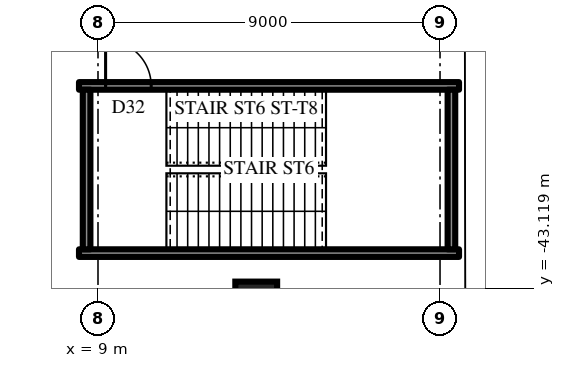
"""IFC4 building model, lengths in metres.
Left out: names, types, materials, properties, quantities, classifications, styles, units other than length and angle.
Written with IfcOpenShell. Run it as: python <this file> out.ifc"""

import sys

from ifc_helpers import new_model, si_unit, direction, frame, frame_2d, origin, origin_2d, place, context, subcontext, project, spatial, rectangle, extrude, element, fill, save


model = new_model("IFC4")
c1 = context("Model", 3, precision=1e-05, world=origin(), true_north=direction((0.0, 1.0)))
c2 = subcontext(c1, "Body", "Model", "MODEL_VIEW")
j1 = project(units=[si_unit("LENGTHUNIT", "METRE"), si_unit("PLANEANGLEUNIT", "RADIAN")], contexts=[c1])
p1 = place(None, origin())
s1 = spatial("IfcSite", under=j1, at=p1, CompositionType="ELEMENT")
p2 = place(p1, origin())
s2 = spatial("IfcBuilding", under=s1, at=p2, CompositionType="ELEMENT")
p3 = place(p2, frame((0.0, 0.0, 13.0)))
s3 = spatial("IfcBuildingStorey", under=s2, at=p3, CompositionType="ELEMENT", Elevation=13.0)
p4 = place(p3, frame((8.5, -42.2, 0.0), z_axis=(0.0, 0.0, 1.0), x_axis=(1.0, 0.0, 0.0)))
e1 = element("IfcWall", 1, at=p4, inside=s3, PredefinedType="SHEAR", context=c2, shape_type="SweptSolid", body=[
    extrude(rectangle(XDim=10.0, YDim=0.2, at=frame_2d((5.0, 0.0))), origin(), (0.0, 0.0, 1.0), 5.5),
])
p5 = place(p3, frame((18.5, -37.8, 0.0), z_axis=(0.0, 0.0, 1.0), x_axis=(-1.0, 0.0, 0.0)))
e2 = element("IfcWall", 2, at=p5, inside=s3, PredefinedType="SHEAR", context=c2, shape_type="SweptSolid", body=[
    extrude(rectangle(XDim=10.0, YDim=0.2, at=frame_2d((5.0, 0.0))), origin(), (0.0, 0.0, 1.0), 5.5),
])
p6 = place(p5, frame((8.1, 0.0, 0.0)))
e3 = element("IfcOpeningElement", 3, at=p6, cuts=e2, PredefinedType="OPENING", context=c2, shape_type="SweptSolid", body=[
    extrude(rectangle(XDim=1.2, YDim=2.2, at=frame_2d((0.6, 1.1))), frame((0.0, 0.11, 0.0), z_axis=(0.0, -1.0, 0.0), x_axis=(1.0, 0.0, 0.0)), (0.0, 0.0, 1.0), 0.22),
])
for number, where, z_axis, x_axis in (
    (4, (8.7, -37.9, 0.0), (0.0, 0.0, 1.0), (0.0, -1.0, 0.0)),
    (5, (18.3, -42.1, 0.0), (0.0, 0.0, 1.0), (0.0, 1.0, 0.0)),
):
    element("IfcWall", number, at=place(p3, frame(where, z_axis=z_axis, x_axis=x_axis)), inside=s3, PredefinedType="SHEAR", context=c2, shape_type="SweptSolid", body=[
        extrude(rectangle(XDim=4.2, YDim=0.2, at=frame_2d((2.1, 0.0))), origin(), (0.0, 0.0, 1.0), 5.5),
    ])
p7 = place(p3, frame((13.164, -43.5, 0.0), z_axis=(0.0, 0.0, 1.0), x_axis=(1.0, 0.0, 0.0)))
e6 = element("IfcColumn", 6, at=p7, inside=s3, PredefinedType="COLUMN", context=c2, shape_type="SweptSolid", body=[
    extrude(rectangle(XDim=1.1, YDim=1.1, at=origin_2d()), origin(), (0.0, 0.0, 1.0), 5.5),
])
p8 = place(p6, frame((1.2, 0.0, 0.0), z_axis=(0.0, 0.0, 1.0), x_axis=(-1.0, 0.0, 0.0)))
e7 = element("IfcDoor", 7, at=p8, inside=s3, OperationType="SINGLE_SWING_RIGHT", PredefinedType="DOOR", context=c2, shape_type="SweptSolid", body=[
    extrude(rectangle(XDim=1.2, YDim=2.2, at=frame_2d((0.6, 1.1))), frame((0.0, 0.025, 0.0), z_axis=(0.0, -1.0, 0.0), x_axis=(1.0, 0.0, 0.0)), (0.0, 0.0, 1.0), 0.05),
])
fill(e3, e7)
save(model, sys.argv[1])
